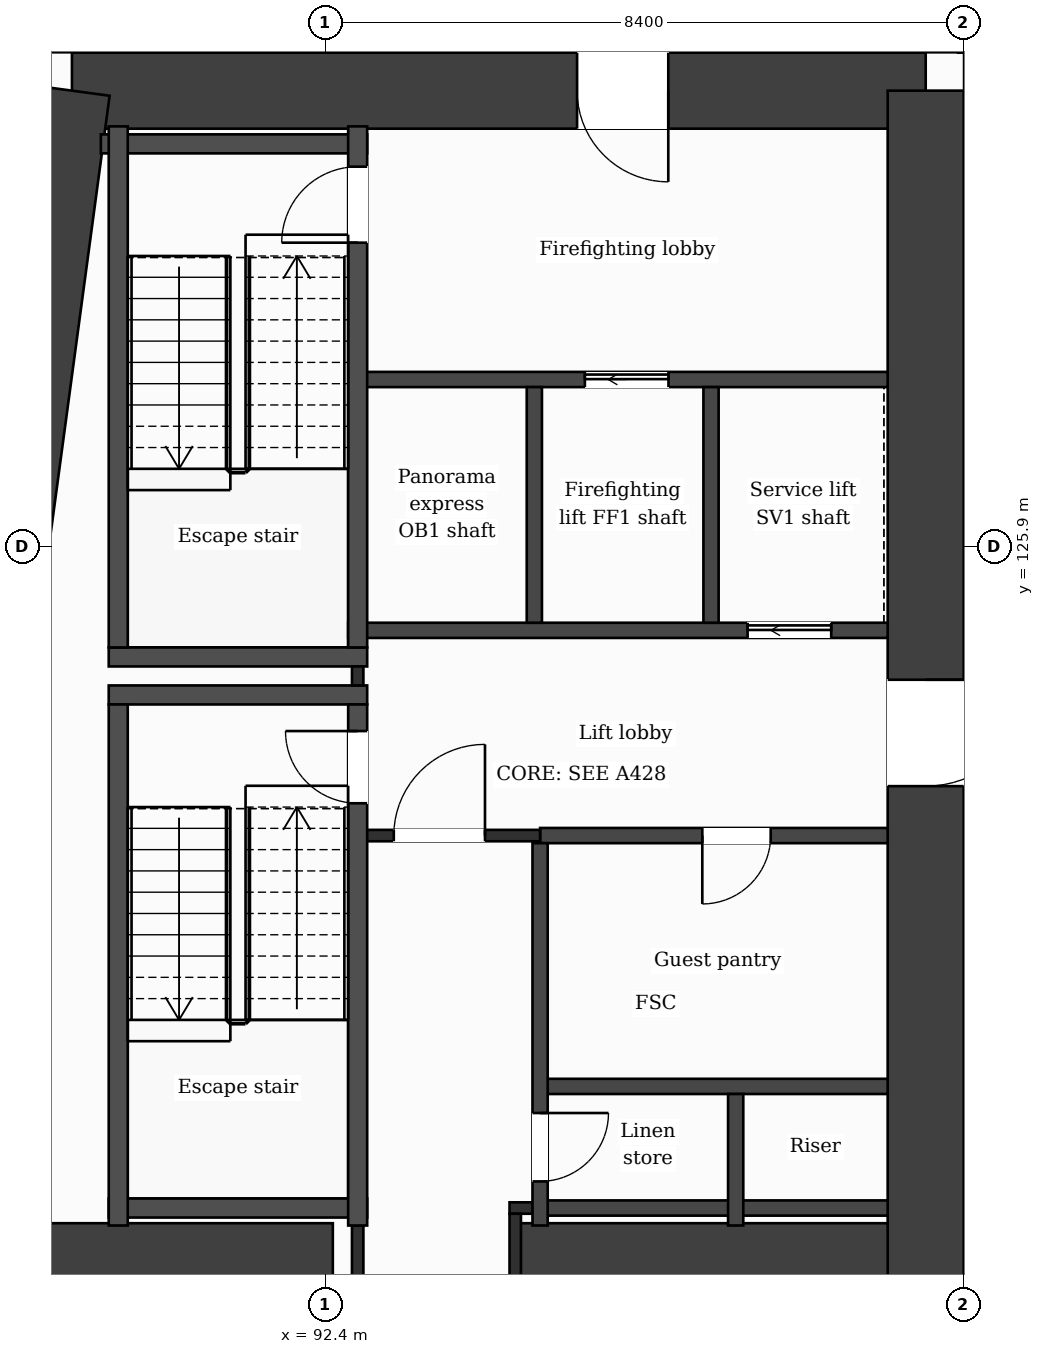
"""IFC4 building model, lengths in metres.
Left out: names, types, materials, properties, quantities, classifications, styles, units other than length and angle.
Written with IfcOpenShell. Run it as: python <this file> out.ifc"""

import sys

from ifc_helpers import new_model, si_unit, direction, frame, frame_2d, origin, place, context, subcontext, project, spatial, rectangle, extrude, element, fill, save


model = new_model("IFC4")
c1 = context("Model", 3, precision=1e-05, world=origin(), true_north=direction((0.0, 1.0)))
c2 = subcontext(c1, "Body", "Model", "MODEL_VIEW")
j1 = project(units=[si_unit("LENGTHUNIT", "METRE"), si_unit("PLANEANGLEUNIT", "RADIAN")], contexts=[c1])
p1 = place(None, origin())
s1 = spatial("IfcSite", under=j1, at=p1, CompositionType="ELEMENT")
p2 = place(p1, origin())
s2 = spatial("IfcBuilding", under=s1, at=p2, CompositionType="ELEMENT")
p3 = place(p2, frame((0.0, 0.0, 116.9)))
s3 = spatial("IfcBuildingStorey", under=s2, at=p3, CompositionType="ELEMENT", Elevation=116.9)
p4 = place(p3, frame((89.068, 131.9, 0.0), z_axis=(0.0, 0.0, 1.0), x_axis=(1.0, 0.0, 0.0)))
e1 = element("IfcWall", 1, at=p4, inside=s3, PredefinedType="SHEAR", context=c2, shape_type="SweptSolid", body=[
    extrude(rectangle(XDim=11.232, YDim=1.0, at=frame_2d((5.616, 0.0))), origin(), (0.0, 0.0, 1.0), 3.7),
])
p5 = place(p4, frame((6.646, 0.0, 0.0)))
e2 = element("IfcOpeningElement", 2, at=p5, cuts=e1, PredefinedType="OPENING", context=c2, shape_type="SweptSolid", body=[
    extrude(rectangle(XDim=1.2, YDim=2.1, at=frame_2d((0.6, 1.05))), frame((0.0, 0.51, 0.0), z_axis=(0.0, -1.0, 0.0), x_axis=(1.0, 0.0, 0.0)), (0.0, 0.0, 1.0), 1.02),
])
p6 = place(p3, frame((100.3, 131.9, 0.0), z_axis=(0.0, 0.0, 1.0), x_axis=(0.0, -1.0, 0.0)))
e3 = element("IfcWall", 3, at=p6, inside=s3, PredefinedType="SHEAR", context=c2, shape_type="SweptSolid", body=[
    extrude(rectangle(XDim=21.0, YDim=1.0, at=frame_2d((10.5, 0.0))), origin(), (0.0, 0.0, 1.0), 3.7),
])
p7 = place(p6, frame((7.75, 0.0, 0.0)))
e4 = element("IfcOpeningElement", 4, at=p7, cuts=e3, PredefinedType="OPENING", context=c2, shape_type="SweptSolid", body=[
    extrude(rectangle(XDim=1.4, YDim=2.1, at=frame_2d((0.7, 1.05))), frame((0.0, 0.51, 0.0), z_axis=(0.0, -1.0, 0.0), x_axis=(1.0, 0.0, 0.0)), (0.0, 0.0, 1.0), 1.02),
])
p8 = place(p3, frame((86.241, 110.9, 0.0), z_axis=(0.0, 0.0, 1.0), x_axis=(0.133411141623, 0.991060778808, 0.0)))
e5 = element("IfcWall", 5, at=p8, inside=s3, PredefinedType="SHEAR", context=c2, shape_type="SweptSolid", body=[
    extrude(rectangle(XDim=21.189, YDim=1.0, at=frame_2d((10.595, 0.0))), origin(), (0.0, 0.0, 1.0), 3.7),
])
p9 = place(p3, frame((87.423, 116.5, 0.0), z_axis=(0.0, 0.0, 1.0), x_axis=(1.0, 0.0, 0.0)))
e6 = element("IfcWall", 6, at=p9, inside=s3, PredefinedType="SHEAR", context=c2, shape_type="SweptSolid", body=[
    extrude(rectangle(XDim=5.077, YDim=1.0, at=frame_2d((2.539, 0.0))), origin(), (0.0, 0.0, 1.0), 3.7),
])
p10 = place(p3, frame((94.9, 116.5, 0.0), z_axis=(0.0, 0.0, 1.0), x_axis=(1.0, 0.0, 0.0)))
e7 = element("IfcWall", 7, at=p10, inside=s3, PredefinedType="SHEAR", context=c2, shape_type="SweptSolid", body=[
    extrude(rectangle(XDim=4.9, YDim=1.0, at=frame_2d((2.45, 0.0))), origin(), (0.0, 0.0, 1.0), 3.7),
])
p11 = place(p3, frame((91.177, 138.95, 0.0), z_axis=(0.0, 0.0, 1.0), x_axis=(-0.133426664613, -0.991058689065, 0.0)))
e8 = element("IfcWall", 8, at=p11, inside=s3, PredefinedType="SOLIDWALL", context=c2, shape_type="SweptSolid", body=[
    extrude(rectangle(XDim=6.609, YDim=0.3, at=frame_2d((3.305, 0.0))), origin(), (0.0, 0.0, 1.0), 3.38),
])
p12 = place(p11, frame((1.039, 0.0, 0.9)))
e9 = element("IfcOpeningElement", 9, at=p12, cuts=e8, PredefinedType="OPENING", context=c2, shape_type="SweptSolid", body=[
    extrude(rectangle(XDim=1.2, YDim=2.1, at=frame_2d((0.6, 1.05))), frame((0.0, 0.16, 0.0), z_axis=(0.0, -1.0, 0.0), x_axis=(1.0, 0.0, 0.0)), (0.0, 0.0, 1.0), 0.32),
])
p13 = place(p11, frame((4.294, 0.0, 0.0)))
e10 = element("IfcOpeningElement", 10, at=p13, cuts=e8, PredefinedType="OPENING", context=c2, shape_type="SweptSolid", body=[
    extrude(rectangle(XDim=1.2, YDim=2.4, at=frame_2d((0.6, 1.2))), frame((0.0, 0.16, 0.0), z_axis=(0.0, -1.0, 0.0), x_axis=(1.0, 0.0, 0.0)), (0.0, 0.0, 1.0), 0.32),
])
p14 = place(p3, frame((95.227, 117.2, 0.0), z_axis=(0.0, 0.0, 1.0), x_axis=(1.0, 0.0, 0.0)))
e11 = element("IfcWall", 11, at=p14, inside=s3, PredefinedType="PARTITIONING", context=c2, shape_type="SweptSolid", body=[
    extrude(rectangle(XDim=4.573, YDim=0.2, at=frame_2d((2.287, 0.0))), origin(), (0.0, 0.0, 1.0), 3.38),
])
p15 = place(p3, frame((94.825, 117.2, 0.0), z_axis=(0.0, 0.0, 1.0), x_axis=(1.0, 0.0, 0.0)))
e12 = element("IfcWall", 12, at=p15, inside=s3, PredefinedType="PARTITIONING", context=c2, shape_type="SweptSolid", body=[
    extrude(rectangle(XDim=0.402, YDim=0.15, at=frame_2d((0.201, 0.0))), origin(), (0.0, 0.0, 1.0), 3.38),
])
p16 = place(p3, frame((89.552, 117.2, 0.0), z_axis=(0.0, 0.0, 1.0), x_axis=(1.0, 0.0, 0.0)))
e13 = element("IfcWall", 13, at=p16, inside=s3, PredefinedType="PARTITIONING", context=c2, shape_type="SweptSolid", body=[
    extrude(rectangle(XDim=3.4, YDim=0.25, at=frame_2d((1.7, 0.0))), origin(), (0.0, 0.0, 1.0), 3.38),
])
p17 = place(p3, frame((95.227, 118.8, 0.0), z_axis=(0.0, 0.0, 1.0), x_axis=(1.0, 0.0, 0.0)))
e14 = element("IfcWall", 14, at=p17, inside=s3, PredefinedType="PARTITIONING", context=c2, shape_type="SweptSolid", body=[
    extrude(rectangle(XDim=4.573, YDim=0.2, at=frame_2d((2.287, 0.0))), origin(), (0.0, 0.0, 1.0), 3.38),
])
p18 = place(p3, frame((95.227, 122.1, 0.0), z_axis=(0.0, 0.0, 1.0), x_axis=(1.0, 0.0, 0.0)))
e15 = element("IfcWall", 15, at=p18, inside=s3, PredefinedType="PARTITIONING", context=c2, shape_type="SweptSolid", body=[
    extrude(rectangle(XDim=4.573, YDim=0.2, at=frame_2d((2.287, 0.0))), origin(), (0.0, 0.0, 1.0), 3.38),
])
p19 = place(p18, frame((2.134, 0.0, 0.0)))
e16 = element("IfcOpeningElement", 16, at=p19, cuts=e15, PredefinedType="OPENING", context=c2, shape_type="SweptSolid", body=[
    extrude(rectangle(XDim=0.9, YDim=2.1, at=frame_2d((0.45, 1.05))), frame((0.0, 0.11, 0.0), z_axis=(0.0, -1.0, 0.0), x_axis=(1.0, 0.0, 0.0)), (0.0, 0.0, 1.0), 0.22),
])
p20 = place(p3, frame((92.827, 122.1, 0.0), z_axis=(0.0, 0.0, 1.0), x_axis=(1.0, 0.0, 0.0)))
e17 = element("IfcWall", 17, at=p20, inside=s3, PredefinedType="PARTITIONING", context=c2, shape_type="SweptSolid", body=[
    extrude(rectangle(XDim=2.4, YDim=0.15, at=frame_2d((1.2, 0.0))), origin(), (0.0, 0.0, 1.0), 3.38),
])
p21 = place(p20, frame((0.475, 0.0, 0.0)))
e18 = element("IfcOpeningElement", 18, at=p21, cuts=e17, PredefinedType="OPENING", context=c2, shape_type="SweptSolid", body=[
    extrude(rectangle(XDim=1.2, YDim=2.1, at=frame_2d((0.6, 1.05))), frame((0.0, 0.085, 0.0), z_axis=(0.0, -1.0, 0.0), x_axis=(1.0, 0.0, 0.0)), (0.0, 0.0, 1.0), 0.17),
])
for number, where, z_axis, x_axis in (
    (19, (89.552, 123.95, 0.0), (0.0, 0.0, 1.0), (1.0, 0.0, 0.0)),
    (20, (89.552, 124.45, 0.0), (0.0, 0.0, 1.0), (1.0, 0.0, 0.0)),
):
    element("IfcWall", number, at=place(p3, frame(where, z_axis=z_axis, x_axis=x_axis)), inside=s3, PredefinedType="PARTITIONING", context=c2, shape_type="SweptSolid", body=[
        extrude(rectangle(XDim=3.4, YDim=0.25, at=frame_2d((1.7, 0.0))), origin(), (0.0, 0.0, 1.0), 3.38),
    ])
p22 = place(p3, frame((92.702, 124.8, 0.0), z_axis=(0.0, 0.0, 1.0), x_axis=(1.0, 0.0, 0.0)))
e21 = element("IfcWall", 21, at=p22, inside=s3, PredefinedType="PARTITIONING", context=c2, shape_type="SweptSolid", body=[
    extrude(rectangle(XDim=7.098, YDim=0.2, at=frame_2d((3.549, 0.0))), origin(), (0.0, 0.0, 1.0), 3.38),
])
p23 = place(p22, frame((5.255, 0.0, 0.0)))
e22 = element("IfcOpeningElement", 22, at=p23, cuts=e21, PredefinedType="OPENING", context=c2, shape_type="SweptSolid", body=[
    extrude(rectangle(XDim=1.1, YDim=2.1, at=frame_2d((0.55, 1.05))), frame((0.0, 0.11, 0.0), z_axis=(0.0, -1.0, 0.0), x_axis=(1.0, 0.0, 0.0)), (0.0, 0.0, 1.0), 0.22),
])
p24 = place(p3, frame((92.827, 128.1, 0.0), z_axis=(0.0, 0.0, 1.0), x_axis=(1.0, 0.0, 0.0)))
e23 = element("IfcWall", 23, at=p24, inside=s3, PredefinedType="PARTITIONING", context=c2, shape_type="SweptSolid", body=[
    extrude(rectangle(XDim=6.973, YDim=0.2, at=frame_2d((3.487, 0.0))), origin(), (0.0, 0.0, 1.0), 3.38),
])
p25 = place(p24, frame((2.989, 0.0, 0.0)))
e24 = element("IfcOpeningElement", 24, at=p25, cuts=e23, PredefinedType="OPENING", context=c2, shape_type="SweptSolid", body=[
    extrude(rectangle(XDim=1.1, YDim=2.1, at=frame_2d((0.55, 1.05))), frame((0.0, 0.11, 0.0), z_axis=(0.0, -1.0, 0.0), x_axis=(1.0, 0.0, 0.0)), (0.0, 0.0, 1.0), 0.22),
])
p26 = place(p3, frame((89.448, 131.2, 0.0), z_axis=(0.0, 0.0, 1.0), x_axis=(1.0, 0.0, 0.0)))
e25 = element("IfcWall", 25, at=p26, inside=s3, PredefinedType="PARTITIONING", context=c2, shape_type="SweptSolid", body=[
    extrude(rectangle(XDim=3.504, YDim=0.25, at=frame_2d((1.752, 0.0))), origin(), (0.0, 0.0, 1.0), 3.38),
])
for number, where, z_axis, x_axis in (
    (26, (89.677, 116.97, 0.0), (0.0, 0.0, 1.0), (0.0, 1.0, 0.0)),
    (27, (89.677, 124.575, 0.0), (0.0, 0.0, 1.0), (0.0, 1.0, 0.0)),
):
    element("IfcWall", number, at=place(p3, frame(where, z_axis=z_axis, x_axis=x_axis)), inside=s3, PredefinedType="PARTITIONING", context=c2, shape_type="SweptSolid", body=[
        extrude(rectangle(XDim=6.855, YDim=0.25, at=frame_2d((3.427, 0.0))), origin(), (0.0, 0.0, 1.0), 3.38),
    ])
p27 = place(p3, frame((92.827, 116.0, 0.0), z_axis=(0.0, 0.0, 1.0), x_axis=(0.0, 1.0, 0.0)))
e28 = element("IfcWall", 28, at=p27, inside=s3, PredefinedType="PARTITIONING", context=c2, shape_type="SweptSolid", body=[
    extrude(rectangle(XDim=0.97, YDim=0.15, at=frame_2d((0.485, 0.0))), origin(), (0.0, 0.0, 1.0), 3.38),
])
p28 = place(p3, frame((92.827, 124.075, 0.0), z_axis=(0.0, 0.0, 1.0), x_axis=(0.0, 1.0, 0.0)))
e29 = element("IfcWall", 29, at=p28, inside=s3, PredefinedType="PARTITIONING", context=c2, shape_type="SweptSolid", body=[
    extrude(rectangle(XDim=0.25, YDim=0.15, at=frame_2d((0.125, 0.0))), origin(), (0.0, 0.0, 1.0), 3.38),
])
p29 = place(p3, frame((92.827, 116.97, 0.0), z_axis=(0.0, 0.0, 1.0), x_axis=(0.0, 1.0, 0.0)))
e30 = element("IfcWall", 30, at=p29, inside=s3, PredefinedType="PARTITIONING", context=c2, shape_type="SweptSolid", body=[
    extrude(rectangle(XDim=6.855, YDim=0.25, at=frame_2d((3.427, 0.0))), origin(), (0.0, 0.0, 1.0), 3.38),
])
p30 = place(p29, frame((5.555, 0.0, 0.0)))
e31 = element("IfcOpeningElement", 31, at=p30, cuts=e30, PredefinedType="OPENING", context=c2, shape_type="SweptSolid", body=[
    extrude(rectangle(XDim=0.95, YDim=2.1, at=frame_2d((0.475, 1.05))), frame((0.0, 0.135, 0.0), z_axis=(0.0, -1.0, 0.0), x_axis=(1.0, 0.0, 0.0)), (0.0, 0.0, 1.0), 0.27),
])
p31 = place(p3, frame((92.827, 124.575, 0.0), z_axis=(0.0, 0.0, 1.0), x_axis=(0.0, 1.0, 0.0)))
e32 = element("IfcWall", 32, at=p31, inside=s3, PredefinedType="PARTITIONING", context=c2, shape_type="SweptSolid", body=[
    extrude(rectangle(XDim=6.855, YDim=0.25, at=frame_2d((3.427, 0.0))), origin(), (0.0, 0.0, 1.0), 3.38),
])
p32 = place(p31, frame((5.325, 0.0, 0.0)))
e33 = element("IfcOpeningElement", 33, at=p32, cuts=e32, PredefinedType="OPENING", context=c2, shape_type="SweptSolid", body=[
    extrude(rectangle(XDim=1.0, YDim=2.1, at=frame_2d((0.5, 1.05))), frame((0.0, 0.135, 0.0), z_axis=(0.0, -1.0, 0.0), x_axis=(1.0, 0.0, 0.0)), (0.0, 0.0, 1.0), 0.27),
])
p33 = place(p3, frame((94.9, 116.0, 0.0), z_axis=(0.0, 0.0, 1.0), x_axis=(0.0, 1.0, 0.0)))
e34 = element("IfcWall", 34, at=p33, inside=s3, PredefinedType="PARTITIONING", context=c2, shape_type="SweptSolid", body=[
    extrude(rectangle(XDim=1.125, YDim=0.15, at=frame_2d((0.562, 0.0))), origin(), (0.0, 0.0, 1.0), 3.38),
])
p34 = place(p3, frame((95.151, 124.9, 0.0), z_axis=(0.0, 0.0, 1.0), x_axis=(0.0, 1.0, 0.0)))
e35 = element("IfcWall", 35, at=p34, inside=s3, PredefinedType="PARTITIONING", context=c2, shape_type="SweptSolid", body=[
    extrude(rectangle(XDim=3.1, YDim=0.2, at=frame_2d((1.55, 0.0))), origin(), (0.0, 0.0, 1.0), 3.38),
])
p35 = place(p3, frame((95.227, 116.97, 0.0), z_axis=(0.0, 0.0, 1.0), x_axis=(0.0, 1.0, 0.0)))
e36 = element("IfcWall", 36, at=p35, inside=s3, PredefinedType="PARTITIONING", context=c2, shape_type="SweptSolid", body=[
    extrude(rectangle(XDim=5.03, YDim=0.2, at=frame_2d((2.515, 0.0))), origin(), (0.0, 0.0, 1.0), 3.38),
])
p36 = place(p35, frame((0.58, 0.0, 0.0)))
e37 = element("IfcOpeningElement", 37, at=p36, cuts=e36, PredefinedType="OPENING", context=c2, shape_type="SweptSolid", body=[
    extrude(rectangle(XDim=0.9, YDim=2.1, at=frame_2d((0.45, 1.05))), frame((0.0, 0.11, 0.0), z_axis=(0.0, -1.0, 0.0), x_axis=(1.0, 0.0, 0.0)), (0.0, 0.0, 1.0), 0.22),
])
p37 = place(p3, frame((97.476, 124.9, 0.0), z_axis=(0.0, 0.0, 1.0), x_axis=(0.0, 1.0, 0.0)))
e38 = element("IfcWall", 38, at=p37, inside=s3, PredefinedType="PARTITIONING", context=c2, shape_type="SweptSolid", body=[
    extrude(rectangle(XDim=3.1, YDim=0.2, at=frame_2d((1.55, 0.0))), origin(), (0.0, 0.0, 1.0), 3.38),
])
p38 = place(p3, frame((97.8, 116.97, 0.0), z_axis=(0.0, 0.0, 1.0), x_axis=(0.0, 1.0, 0.0)))
e39 = element("IfcWall", 39, at=p38, inside=s3, PredefinedType="PARTITIONING", context=c2, shape_type="SweptSolid", body=[
    extrude(rectangle(XDim=1.73, YDim=0.2, at=frame_2d((0.865, 0.0))), origin(), (0.0, 0.0, 1.0), 3.38),
])
p39 = place(p21, origin())
e40 = element("IfcDoor", 40, at=p39, inside=s3, OperationType="SINGLE_SWING_RIGHT", PredefinedType="DOOR", context=c2, shape_type="SweptSolid", body=[
    extrude(rectangle(XDim=1.2, YDim=2.1, at=frame_2d((0.6, 1.05))), frame((0.0, 0.025, 0.0), z_axis=(0.0, -1.0, 0.0), x_axis=(1.0, 0.0, 0.0)), (0.0, 0.0, 1.0), 0.05),
])
fill(e18, e40)
p40 = place(p25, origin())
e41 = element("IfcDoor", 41, at=p40, inside=s3, OperationType="SLIDING_TO_LEFT", PredefinedType="DOOR", context=c2, shape_type="SweptSolid", body=[
    extrude(rectangle(XDim=1.1, YDim=2.1, at=frame_2d((0.55, 1.05))), frame((0.0, 0.025, 0.0), z_axis=(0.0, -1.0, 0.0), x_axis=(1.0, 0.0, 0.0)), (0.0, 0.0, 1.0), 0.05),
])
fill(e24, e41)
p41 = place(p23, origin())
e42 = element("IfcDoor", 42, at=p41, inside=s3, OperationType="SLIDING_TO_LEFT", PredefinedType="DOOR", context=c2, shape_type="SweptSolid", body=[
    extrude(rectangle(XDim=1.1, YDim=2.1, at=frame_2d((0.55, 1.05))), frame((0.0, 0.025, 0.0), z_axis=(0.0, -1.0, 0.0), x_axis=(1.0, 0.0, 0.0)), (0.0, 0.0, 1.0), 0.05),
])
fill(e22, e42)
p42 = place(p19, origin())
e43 = element("IfcDoor", 43, at=p42, inside=s3, OperationType="SINGLE_SWING_LEFT", PredefinedType="DOOR", context=c2, shape_type="SweptSolid", body=[
    extrude(rectangle(XDim=0.9, YDim=2.1, at=frame_2d((0.45, 1.05))), frame((0.0, 0.025, 0.0), z_axis=(0.0, -1.0, 0.0), x_axis=(1.0, 0.0, 0.0)), (0.0, 0.0, 1.0), 0.05),
])
fill(e16, e43)
p43 = place(p30, origin())
e44 = element("IfcDoor", 44, at=p43, inside=s3, OperationType="SINGLE_SWING_RIGHT", PredefinedType="DOOR", context=c2, shape_type="SweptSolid", body=[
    extrude(rectangle(XDim=0.95, YDim=2.1, at=frame_2d((0.475, 1.05))), frame((0.0, 0.025, 0.0), z_axis=(0.0, -1.0, 0.0), x_axis=(1.0, 0.0, 0.0)), (0.0, 0.0, 1.0), 0.05),
])
fill(e31, e44)
p44 = place(p32, origin())
e45 = element("IfcDoor", 45, at=p44, inside=s3, OperationType="SINGLE_SWING_LEFT", PredefinedType="DOOR", context=c2, shape_type="SweptSolid", body=[
    extrude(rectangle(XDim=1.0, YDim=2.1, at=frame_2d((0.5, 1.05))), frame((0.0, 0.025, 0.0), z_axis=(0.0, -1.0, 0.0), x_axis=(1.0, 0.0, 0.0)), (0.0, 0.0, 1.0), 0.05),
])
fill(e33, e45)
p45 = place(p36, origin())
e46 = element("IfcDoor", 46, at=p45, inside=s3, OperationType="SINGLE_SWING_RIGHT", PredefinedType="DOOR", context=c2, shape_type="SweptSolid", body=[
    extrude(rectangle(XDim=0.9, YDim=2.1, at=frame_2d((0.45, 1.05))), frame((0.0, 0.025, 0.0), z_axis=(0.0, -1.0, 0.0), x_axis=(1.0, 0.0, 0.0)), (0.0, 0.0, 1.0), 0.05),
])
fill(e37, e46)
p46 = place(p5, origin())
e47 = element("IfcDoor", 47, at=p46, inside=s3, OperationType="SINGLE_SWING_RIGHT", PredefinedType="DOOR", context=c2, shape_type="SweptSolid", body=[
    extrude(rectangle(XDim=1.2, YDim=2.1, at=frame_2d((0.6, 1.05))), frame((0.0, 0.025, 0.0), z_axis=(0.0, -1.0, 0.0), x_axis=(1.0, 0.0, 0.0)), (0.0, 0.0, 1.0), 0.05),
])
fill(e2, e47)
p47 = place(p7, origin())
e48 = element("IfcDoor", 48, at=p47, inside=s3, OperationType="SINGLE_SWING_LEFT", PredefinedType="DOOR", context=c2, shape_type="SweptSolid", body=[
    extrude(rectangle(XDim=1.4, YDim=2.1, at=frame_2d((0.7, 1.05))), frame((0.0, 0.025, 0.0), z_axis=(0.0, -1.0, 0.0), x_axis=(1.0, 0.0, 0.0)), (0.0, 0.0, 1.0), 0.05),
])
fill(e4, e48)
save(model, sys.argv[1])
